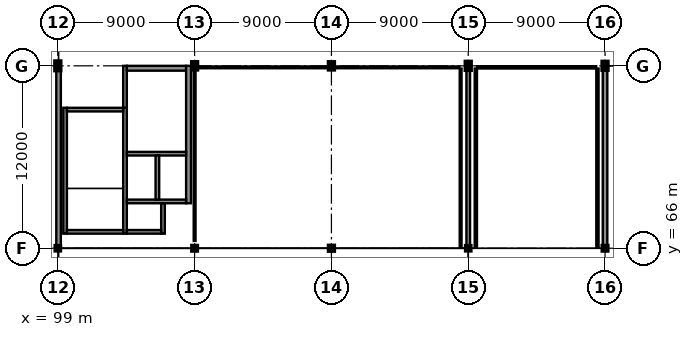
"""IFC4 building model, lengths in metres.
Left out: names, types, materials, properties, quantities, classifications, styles, units other than length and angle.
Written with IfcOpenShell. Run it as: python <this file> out.ifc"""

import sys

from ifc_helpers import new_model, si_unit, direction, frame, frame_2d, origin, origin_2d, place, context, subcontext, project, spatial, rectangle, i_section, extrude, element, fill, save


model = new_model("IFC4")
c1 = context("Model", 3, precision=1e-05, world=origin(), true_north=direction((0.0, 1.0)))
c2 = subcontext(c1, "Body", "Model", "MODEL_VIEW")
j1 = project(units=[si_unit("LENGTHUNIT", "METRE"), si_unit("PLANEANGLEUNIT", "RADIAN")], contexts=[c1])
p1 = place(None, origin())
s1 = spatial("IfcSite", under=j1, at=p1, CompositionType="ELEMENT")
p2 = place(p1, origin())
s2 = spatial("IfcBuilding", under=s1, at=p2, CompositionType="ELEMENT")
p3 = place(p2, frame((0.0, 0.0, 14.4)))
s3 = spatial("IfcBuildingStorey", under=s2, at=p3, CompositionType="ELEMENT", Elevation=14.4)
p4 = place(p3, frame((99.0, 66.0, 0.0), z_axis=(0.0, 0.0, 1.0), x_axis=(1.0, 0.0, 0.0)))
e1 = element("IfcColumn", 1, at=p4, inside=s3, PredefinedType="COLUMN", context=c2, shape_type="SweptSolid", body=[
    extrude(i_section(OverallWidth=0.26, OverallDepth=0.26, WebThickness=0.01, FlangeThickness=0.018, at=origin_2d()), origin(), (0.0, 0.0, 1.0), 4.5),
])
p5 = place(p3, frame((99.0, 78.0, 0.0), z_axis=(0.0, 0.0, 1.0), x_axis=(1.0, 0.0, 0.0)))
e2 = element("IfcColumn", 2, at=p5, inside=s3, PredefinedType="COLUMN", context=c2, shape_type="SweptSolid", body=[
    extrude(i_section(OverallWidth=0.3, OverallDepth=0.55, WebThickness=0.015, FlangeThickness=0.029, at=origin_2d()), origin(), (0.0, 0.0, 1.0), 4.5),
])
p6 = place(p3, frame((108.0, 66.0, 0.0), z_axis=(0.0, 0.0, 1.0), x_axis=(1.0, 0.0, 0.0)))
e3 = element("IfcColumn", 3, at=p6, inside=s3, PredefinedType="COLUMN", context=c2, shape_type="SweptSolid", body=[
    extrude(i_section(OverallWidth=0.28, OverallDepth=0.28, WebThickness=0.01, FlangeThickness=0.018, at=origin_2d()), origin(), (0.0, 0.0, 1.0), 4.5),
])
p7 = place(p3, frame((108.0, 78.0, 0.0), z_axis=(0.0, 0.0, 1.0), x_axis=(0.0, 1.0, 0.0)))
e4 = element("IfcColumn", 4, at=p7, inside=s3, PredefinedType="COLUMN", context=c2, shape_type="SweptSolid", body=[
    extrude(i_section(OverallWidth=0.3, OverallDepth=0.45, WebThickness=0.014, FlangeThickness=0.026, at=origin_2d()), origin(), (0.0, 0.0, 1.0), 4.5),
])
p8 = place(p3, frame((117.0, 66.0, 0.0), z_axis=(0.0, 0.0, 1.0), x_axis=(1.0, 0.0, 0.0)))
e5 = element("IfcColumn", 5, at=p8, inside=s3, PredefinedType="COLUMN", context=c2, shape_type="SweptSolid", body=[
    extrude(i_section(OverallWidth=0.3, OverallDepth=0.3, WebThickness=0.011, FlangeThickness=0.019, at=origin_2d()), origin(), (0.0, 0.0, 1.0), 4.5),
])
p9 = place(p3, frame((117.0, 78.0, 0.0), z_axis=(0.0, 0.0, 1.0), x_axis=(1.0, 0.0, 0.0)))
e6 = element("IfcColumn", 6, at=p9, inside=s3, PredefinedType="COLUMN", context=c2, shape_type="SweptSolid", body=[
    extrude(i_section(OverallWidth=0.3, OverallDepth=0.45, WebThickness=0.014, FlangeThickness=0.026, at=origin_2d()), origin(), (0.0, 0.0, 1.0), 4.5),
])
p10 = place(p3, frame((126.0, 66.0, 0.0), z_axis=(0.0, 0.0, 1.0), x_axis=(0.0, 1.0, 0.0)))
e7 = element("IfcColumn", 7, at=p10, inside=s3, PredefinedType="COLUMN", context=c2, shape_type="SweptSolid", body=[
    extrude(i_section(OverallWidth=0.26, OverallDepth=0.26, WebThickness=0.01, FlangeThickness=0.018, at=origin_2d()), origin(), (0.0, 0.0, 1.0), 4.5),
])
p11 = place(p3, frame((126.0, 78.0, 0.0), z_axis=(0.0, 0.0, 1.0), x_axis=(1.0, 0.0, 0.0)))
e8 = element("IfcColumn", 8, at=p11, inside=s3, PredefinedType="COLUMN", context=c2, shape_type="SweptSolid", body=[
    extrude(i_section(OverallWidth=0.3, OverallDepth=0.5, WebThickness=0.014, FlangeThickness=0.028, at=origin_2d()), origin(), (0.0, 0.0, 1.0), 4.5),
])
p12 = place(p3, frame((135.0, 66.0, 0.0), z_axis=(0.0, 0.0, 1.0), x_axis=(1.0, 0.0, 0.0)))
e9 = element("IfcColumn", 9, at=p12, inside=s3, PredefinedType="COLUMN", context=c2, shape_type="SweptSolid", body=[
    extrude(i_section(OverallWidth=0.28, OverallDepth=0.28, WebThickness=0.01, FlangeThickness=0.018, at=origin_2d()), origin(), (0.0, 0.0, 1.0), 4.5),
])
p13 = place(p3, frame((135.0, 78.0, 0.0), z_axis=(0.0, 0.0, 1.0), x_axis=(1.0, 0.0, 0.0)))
e10 = element("IfcColumn", 10, at=p13, inside=s3, PredefinedType="COLUMN", context=c2, shape_type="SweptSolid", body=[
    extrude(i_section(OverallWidth=0.3, OverallDepth=0.5, WebThickness=0.014, FlangeThickness=0.028, at=origin_2d()), origin(), (0.0, 0.0, 1.0), 4.5),
])
p14 = place(p3, frame((135.0, 66.138, 0.0), z_axis=(0.0, 0.0, 1.0), x_axis=(0.0, 1.0, 0.0)))
e11 = element("IfcWall", 11, at=p14, inside=s3, PredefinedType="SOLIDWALL", context=c2, shape_type="SweptSolid", body=[
    extrude(rectangle(XDim=11.614, YDim=0.3, at=frame_2d((5.807, 0.0))), origin(), (0.0, 0.0, 1.0), 3.805),
])
p15 = place(p14, frame((2.252, 0.0, 0.85)))
e12 = element("IfcOpeningElement", 12, at=p15, cuts=e11, PredefinedType="OPENING", context=c2, shape_type="SweptSolid", body=[
    extrude(rectangle(XDim=2.0, YDim=2.0, at=frame_2d((1.0, 1.0))), frame((0.0, 0.165, 0.0), z_axis=(0.0, -1.0, 0.0), x_axis=(1.0, 0.0, 0.0)), (0.0, 0.0, 1.0), 0.33),
])
p16 = place(p14, frame((7.362, 0.0, 0.85)))
e13 = element("IfcOpeningElement", 13, at=p16, cuts=e11, PredefinedType="OPENING", context=c2, shape_type="SweptSolid", body=[
    extrude(rectangle(XDim=2.0, YDim=2.0, at=frame_2d((1.0, 1.0))), frame((0.0, 0.165, 0.0), z_axis=(0.0, -1.0, 0.0), x_axis=(1.0, 0.0, 0.0)), (0.0, 0.0, 1.0), 0.33),
])
p17 = place(p3, frame((99.05, 77.727, 0.0), z_axis=(0.0, 0.0, 1.0), x_axis=(0.0, -1.0, 0.0)))
e14 = element("IfcWall", 14, at=p17, inside=s3, PredefinedType="SOLIDWALL", context=c2, shape_type="SweptSolid", body=[
    extrude(rectangle(XDim=11.599, YDim=0.3, at=frame_2d((5.8, 0.0))), origin(), (0.0, 0.0, 1.0), 3.705),
])
p18 = place(p3, frame((99.48, 66.96, 0.0), z_axis=(0.0, 0.0, 1.0), x_axis=(0.0, 1.0, 0.0)))
e15 = element("IfcWall", 15, at=p18, inside=s3, PredefinedType="SHEAR", context=c2, shape_type="SweptSolid", body=[
    extrude(rectangle(XDim=8.28, YDim=0.24, at=frame_2d((4.14, 0.0))), origin(), (0.0, 0.0, 1.0), 4.31),
])
p19 = place(p3, frame((103.42, 66.96, 0.0), z_axis=(0.0, 0.0, 1.0), x_axis=(0.0, 1.0, 0.0)))
e16 = element("IfcWall", 16, at=p19, inside=s3, PredefinedType="SHEAR", context=c2, shape_type="SweptSolid", body=[
    extrude(rectangle(XDim=8.28, YDim=0.24, at=frame_2d((4.14, 0.0))), origin(), (0.0, 0.0, 1.0), 4.31),
])
p20 = place(p19, frame((6.49, 0.0, 0.0)))
e17 = element("IfcOpeningElement", 17, at=p20, cuts=e16, PredefinedType="OPENING", context=c2, shape_type="SweptSolid", body=[
    extrude(rectangle(XDim=1.3, YDim=2.2, at=frame_2d((0.65, 1.1))), frame((0.0, 0.135, 0.0), z_axis=(0.0, -1.0, 0.0), x_axis=(1.0, 0.0, 0.0)), (0.0, 0.0, 1.0), 0.27),
])
for number, where, z_axis, x_axis in (
    (18, (99.6, 67.08, 0.0), (0.0, 0.0, 1.0), (1.0, 0.0, 0.0)),
    (19, (99.6, 75.12, 0.0), (0.0, 0.0, 1.0), (1.0, 0.0, 0.0)),
):
    element("IfcWall", number, at=place(p3, frame(where, z_axis=z_axis, x_axis=x_axis)), inside=s3, PredefinedType="SHEAR", context=c2, shape_type="SweptSolid", body=[
        extrude(rectangle(XDim=3.7, YDim=0.24, at=frame_2d((1.85, 0.0))), origin(), (0.0, 0.0, 1.0), 4.31),
    ])
p21 = place(p3, frame((103.42, 75.24, 0.0), z_axis=(0.0, 0.0, 1.0), x_axis=(0.0, 1.0, 0.0)))
e20 = element("IfcWall", 20, at=p21, inside=s3, PredefinedType="SHEAR", context=c2, shape_type="SweptSolid", body=[
    extrude(rectangle(XDim=2.76, YDim=0.24, at=frame_2d((1.38, 0.0))), origin(), (0.0, 0.0, 1.0), 4.16),
])
p22 = place(p3, frame((103.54, 77.84, 0.0), z_axis=(0.0, 0.0, 1.0), x_axis=(1.0, 0.0, 0.0)))
e21 = element("IfcWall", 21, at=p22, inside=s3, PredefinedType="SHEAR", context=c2, shape_type="SweptSolid", body=[
    extrude(rectangle(XDim=3.9, YDim=0.32, at=frame_2d((1.95, 0.0))), origin(), (0.0, 0.0, 1.0), 4.16),
])
p23 = place(p22, frame((1.225, 0.0, 0.0)))
e22 = element("IfcOpeningElement", 22, at=p23, cuts=e21, PredefinedType="OPENING", context=c2, shape_type="SweptSolid", body=[
    extrude(rectangle(XDim=1.45, YDim=2.2, at=frame_2d((0.725, 1.1))), frame((0.0, 0.175, 0.0), z_axis=(0.0, -1.0, 0.0), x_axis=(1.0, 0.0, 0.0)), (0.0, 0.0, 1.0), 0.35),
])
p24 = place(p3, frame((107.6, 68.96, 0.0), z_axis=(0.0, 0.0, 1.0), x_axis=(0.0, 1.0, 0.0)))
e23 = element("IfcWall", 23, at=p24, inside=s3, PredefinedType="SHEAR", context=c2, shape_type="SweptSolid", body=[
    extrude(rectangle(XDim=9.04, YDim=0.32, at=frame_2d((4.52, 0.0))), origin(), (0.0, 0.0, 1.0), 4.16),
])
p25 = place(p3, frame((103.54, 72.22, 0.0), z_axis=(0.0, 0.0, 1.0), x_axis=(1.0, 0.0, 0.0)))
e24 = element("IfcWall", 24, at=p25, inside=s3, PredefinedType="SHEAR", context=c2, shape_type="SweptSolid", body=[
    extrude(rectangle(XDim=3.9, YDim=0.24, at=frame_2d((1.95, 0.0))), origin(), (0.0, 0.0, 1.0), 4.31),
])
p26 = place(p25, frame((0.385, 0.0, 0.0)))
e25 = element("IfcOpeningElement", 25, at=p26, cuts=e24, PredefinedType="OPENING", context=c2, shape_type="SweptSolid", body=[
    extrude(rectangle(XDim=1.3, YDim=2.2, at=frame_2d((0.65, 1.1))), frame((0.0, 0.135, 0.0), z_axis=(0.0, -1.0, 0.0), x_axis=(1.0, 0.0, 0.0)), (0.0, 0.0, 1.0), 0.27),
])
p27 = place(p25, frame((2.335, 0.0, 0.0)))
e26 = element("IfcOpeningElement", 26, at=p27, cuts=e24, PredefinedType="OPENING", context=c2, shape_type="SweptSolid", body=[
    extrude(rectangle(XDim=1.3, YDim=2.2, at=frame_2d((0.65, 1.1))), frame((0.0, 0.135, 0.0), z_axis=(0.0, -1.0, 0.0), x_axis=(1.0, 0.0, 0.0)), (0.0, 0.0, 1.0), 0.27),
])
p28 = place(p3, frame((103.54, 69.08, 0.0), z_axis=(0.0, 0.0, 1.0), x_axis=(1.0, 0.0, 0.0)))
e27 = element("IfcWall", 27, at=p28, inside=s3, PredefinedType="SHEAR", context=c2, shape_type="SweptSolid", body=[
    extrude(rectangle(XDim=3.9, YDim=0.24, at=frame_2d((1.95, 0.0))), origin(), (0.0, 0.0, 1.0), 4.31),
])
p29 = place(p3, frame((105.55, 69.2, 0.0), z_axis=(0.0, 0.0, 1.0), x_axis=(0.0, 1.0, 0.0)))
e28 = element("IfcWall", 28, at=p29, inside=s3, PredefinedType="SHEAR", context=c2, shape_type="SweptSolid", body=[
    extrude(rectangle(XDim=2.9, YDim=0.24, at=frame_2d((1.45, 0.0))), origin(), (0.0, 0.0, 1.0), 4.31),
])
p30 = place(p3, frame((105.92, 66.96, 0.0), z_axis=(0.0, 0.0, 1.0), x_axis=(0.0, 1.0, 0.0)))
e29 = element("IfcWall", 29, at=p30, inside=s3, PredefinedType="SHEAR", context=c2, shape_type="SweptSolid", body=[
    extrude(rectangle(XDim=2.0, YDim=0.24, at=frame_2d((1.0, 0.0))), origin(), (0.0, 0.0, 1.0), 4.31),
])
p31 = place(p3, frame((103.54, 67.08, 0.0), z_axis=(0.0, 0.0, 1.0), x_axis=(1.0, 0.0, 0.0)))
e30 = element("IfcWall", 30, at=p31, inside=s3, PredefinedType="SHEAR", context=c2, shape_type="SweptSolid", body=[
    extrude(rectangle(XDim=2.26, YDim=0.24, at=frame_2d((1.13, 0.0))), origin(), (0.0, 0.0, 1.0), 4.31),
])
p32 = place(p3, frame((126.0, 66.008, 0.0), z_axis=(0.0, 0.0, 1.0), x_axis=(0.0, 1.0, 0.0)))
e31 = element("IfcWall", 31, at=p32, inside=s3, PredefinedType="SHEAR", context=c2, shape_type="SweptSolid", body=[
    extrude(rectangle(XDim=11.744, YDim=0.24, at=frame_2d((5.872, 0.0))), origin(), (0.0, 0.0, 1.0), 3.845),
])
p33 = place(p3, frame((108.0, 66.48, 0.0), z_axis=(0.0, 0.0, 1.0), x_axis=(0.0, 1.0, 0.0)))
e32 = element("IfcWall", 32, at=p33, inside=s3, PredefinedType="PARTITIONING", context=c2, shape_type="SweptSolid", body=[
    extrude(rectangle(XDim=11.34, YDim=0.12, at=frame_2d((5.67, 0.0))), origin(), (0.0, 0.0, 1.0), 3.645),
])
p34 = place(p3, frame((107.823, 77.9, 0.0), z_axis=(0.0, 0.0, 1.0), x_axis=(1.0, 0.0, 0.0)))
e33 = element("IfcWall", 33, at=p34, inside=s3, PredefinedType="PARTITIONING", context=c2, shape_type="SweptSolid", body=[
    extrude(rectangle(XDim=17.597, YDim=0.12, at=frame_2d((8.798, 0.0))), origin(), (0.0, 0.0, 1.0), 3.655),
])
p35 = place(p34, frame((7.645, 0.0, 0.0)))
e34 = element("IfcOpeningElement", 34, at=p35, cuts=e33, PredefinedType="OPENING", context=c2, shape_type="SweptSolid", body=[
    extrude(rectangle(XDim=0.9, YDim=2.1, at=frame_2d((0.45, 1.05))), frame((0.0, 0.075, 0.0), z_axis=(0.0, -1.0, 0.0), x_axis=(1.0, 0.0, 0.0)), (0.0, 0.0, 1.0), 0.15),
])
p36 = place(p3, frame((125.5, 77.82, 0.0), z_axis=(0.0, 0.0, 1.0), x_axis=(0.0, -1.0, 0.0)))
e35 = element("IfcWall", 35, at=p36, inside=s3, PredefinedType="PARTITIONING", context=c2, shape_type="SweptSolid", body=[
    extrude(rectangle(XDim=11.745, YDim=0.12, at=frame_2d((5.873, 0.0))), origin(), (0.0, 0.0, 1.0), 4.14),
])
p37 = place(p3, frame((126.5, 66.075, 0.0), z_axis=(0.0, 0.0, 1.0), x_axis=(0.0, 1.0, 0.0)))
e36 = element("IfcWall", 36, at=p37, inside=s3, PredefinedType="PARTITIONING", context=c2, shape_type="SweptSolid", body=[
    extrude(rectangle(XDim=11.745, YDim=0.15, at=frame_2d((5.873, 0.0))), origin(), (0.0, 0.0, 1.0), 4.14),
])
p38 = place(p3, frame((126.58, 77.9, 0.0), z_axis=(0.0, 0.0, 1.0), x_axis=(1.0, 0.0, 0.0)))
e37 = element("IfcWall", 37, at=p38, inside=s3, PredefinedType="PARTITIONING", context=c2, shape_type="SweptSolid", body=[
    extrude(rectangle(XDim=7.84, YDim=0.15, at=frame_2d((3.92, 0.0))), origin(), (0.0, 0.0, 1.0), 3.655),
])
p39 = place(p38, frame((3.395, 0.0, 0.0)))
e38 = element("IfcOpeningElement", 38, at=p39, cuts=e37, PredefinedType="OPENING", context=c2, shape_type="SweptSolid", body=[
    extrude(rectangle(XDim=1.05, YDim=2.25, at=frame_2d((0.525, 1.125))), frame((0.0, 0.09, 0.0), z_axis=(0.0, -1.0, 0.0), x_axis=(1.0, 0.0, 0.0)), (0.0, 0.0, 1.0), 0.18),
])
p40 = place(p3, frame((134.5, 77.82, 0.0), z_axis=(0.0, 0.0, 1.0), x_axis=(0.0, -1.0, 0.0)))
e39 = element("IfcWall", 39, at=p40, inside=s3, PredefinedType="PARTITIONING", context=c2, shape_type="SweptSolid", body=[
    extrude(rectangle(XDim=11.745, YDim=0.15, at=frame_2d((5.873, 0.0))), origin(), (0.0, 0.0, 1.0), 4.14),
])
p41 = place(p15, origin())
e40 = element("IfcWindow", 40, at=p41, inside=s3, PartitioningType="SINGLE_PANEL", PredefinedType="WINDOW", context=c2, shape_type="SweptSolid", body=[
    extrude(rectangle(XDim=2.0, YDim=2.0, at=frame_2d((1.0, 1.0))), frame((0.0, 0.03, 0.0), z_axis=(0.0, -1.0, 0.0), x_axis=(1.0, 0.0, 0.0)), (0.0, 0.0, 1.0), 0.06),
])
fill(e12, e40)
p42 = place(p16, origin())
e41 = element("IfcWindow", 41, at=p42, inside=s3, PartitioningType="SINGLE_PANEL", PredefinedType="WINDOW", context=c2, shape_type="SweptSolid", body=[
    extrude(rectangle(XDim=2.0, YDim=2.0, at=frame_2d((1.0, 1.0))), frame((0.0, 0.03, 0.0), z_axis=(0.0, -1.0, 0.0), x_axis=(1.0, 0.0, 0.0)), (0.0, 0.0, 1.0), 0.06),
])
fill(e13, e41)
p43 = place(p20, frame((1.3, 0.0, 0.0), z_axis=(0.0, 0.0, 1.0), x_axis=(-1.0, 0.0, 0.0)))
e42 = element("IfcDoor", 42, at=p43, inside=s3, OperationType="SINGLE_SWING_RIGHT", PredefinedType="DOOR", context=c2, shape_type="SweptSolid", body=[
    extrude(rectangle(XDim=1.3, YDim=2.2, at=frame_2d((0.65, 1.1))), frame((0.0, 0.025, 0.0), z_axis=(0.0, -1.0, 0.0), x_axis=(1.0, 0.0, 0.0)), (0.0, 0.0, 1.0), 0.05),
])
fill(e17, e42)
p44 = place(p23, origin())
e43 = element("IfcDoor", 43, at=p44, inside=s3, OperationType="DOUBLE_DOOR_SINGLE_SWING", PredefinedType="DOOR", context=c2, shape_type="SweptSolid", body=[
    extrude(rectangle(XDim=1.45, YDim=2.2, at=frame_2d((0.725, 1.1))), frame((0.0, 0.025, 0.0), z_axis=(0.0, -1.0, 0.0), x_axis=(1.0, 0.0, 0.0)), (0.0, 0.0, 1.0), 0.05),
])
fill(e22, e43)
p45 = place(p26, origin())
e44 = element("IfcDoor", 44, at=p45, inside=s3, OperationType="DOUBLE_DOOR_SLIDING", PredefinedType="DOOR", context=c2, shape_type="SweptSolid", body=[
    extrude(rectangle(XDim=1.3, YDim=2.2, at=frame_2d((0.65, 1.1))), frame((0.0, 0.025, 0.0), z_axis=(0.0, -1.0, 0.0), x_axis=(1.0, 0.0, 0.0)), (0.0, 0.0, 1.0), 0.05),
])
fill(e25, e44)
p46 = place(p27, origin())
e45 = element("IfcDoor", 45, at=p46, inside=s3, OperationType="DOUBLE_DOOR_SLIDING", PredefinedType="DOOR", context=c2, shape_type="SweptSolid", body=[
    extrude(rectangle(XDim=1.3, YDim=2.2, at=frame_2d((0.65, 1.1))), frame((0.0, 0.025, 0.0), z_axis=(0.0, -1.0, 0.0), x_axis=(1.0, 0.0, 0.0)), (0.0, 0.0, 1.0), 0.05),
])
fill(e26, e45)
p47 = place(p35, origin())
e46 = element("IfcDoor", 46, at=p47, inside=s3, OperationType="SINGLE_SWING_RIGHT", PredefinedType="DOOR", context=c2, shape_type="SweptSolid", body=[
    extrude(rectangle(XDim=0.9, YDim=2.1, at=frame_2d((0.45, 1.05))), frame((0.0, 0.025, 0.0), z_axis=(0.0, -1.0, 0.0), x_axis=(1.0, 0.0, 0.0)), (0.0, 0.0, 1.0), 0.05),
])
fill(e34, e46)
p48 = place(p39, frame((1.05, 0.0, 0.0), z_axis=(0.0, 0.0, 1.0), x_axis=(-1.0, 0.0, 0.0)))
e47 = element("IfcDoor", 47, at=p48, inside=s3, OperationType="SINGLE_SWING_LEFT", PredefinedType="DOOR", context=c2, shape_type="SweptSolid", body=[
    extrude(rectangle(XDim=1.05, YDim=2.25, at=frame_2d((0.525, 1.125))), frame((0.0, 0.025, 0.0), z_axis=(0.0, -1.0, 0.0), x_axis=(1.0, 0.0, 0.0)), (0.0, 0.0, 1.0), 0.05),
])
fill(e38, e47)
save(model, sys.argv[1])
